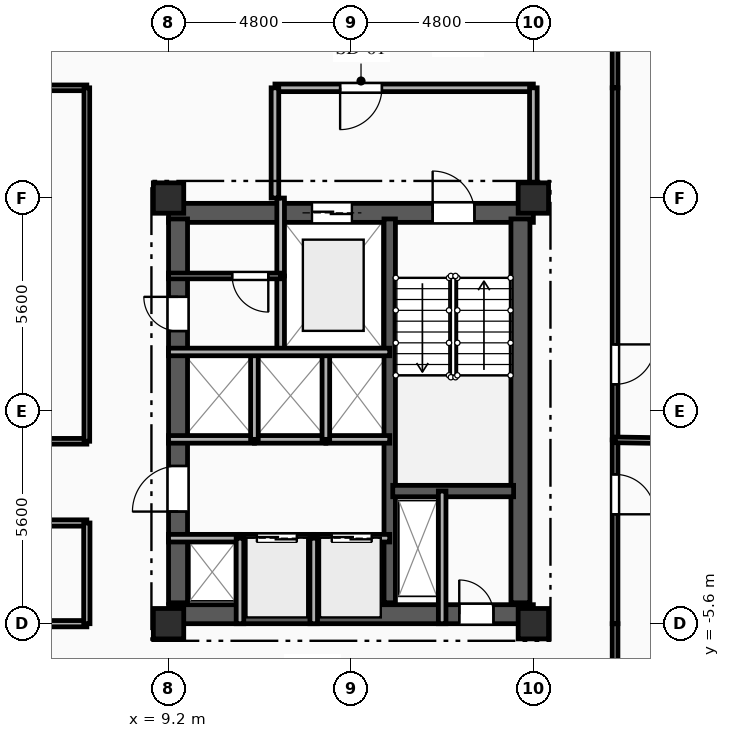
"""IFC4 building model, lengths in metres.
Left out: names, types, materials, properties, quantities, classifications, styles, units other than length and angle.
Written with IfcOpenShell. Run it as: python <this file> out.ifc"""

import sys

from ifc_helpers import new_model, si_unit, direction, frame, frame_2d, origin, origin_2d, place, context, subcontext, project, spatial, rectangle, extrude, element, fill, save


model = new_model("IFC4")
c1 = context("Model", 3, precision=1e-05, world=origin(), true_north=direction((0.0, 1.0)))
c2 = subcontext(c1, "Body", "Model", "MODEL_VIEW")
j1 = project(units=[si_unit("LENGTHUNIT", "METRE"), si_unit("PLANEANGLEUNIT", "RADIAN")], contexts=[c1])
p1 = place(None, origin())
s1 = spatial("IfcSite", under=j1, at=p1, CompositionType="ELEMENT")
p2 = place(p1, origin())
s2 = spatial("IfcBuilding", under=s1, at=p2, CompositionType="ELEMENT")
p3 = place(p2, frame((0.0, 0.0, 213.15)))
s3 = spatial("IfcBuildingStorey", under=s2, at=p3, CompositionType="ELEMENT", Elevation=213.15)
for number, where, z_axis, x_axis in (
    (1, (9.2, -5.6, 0.0), (0.0, 0.0, 1.0), (1.0, 0.0, 0.0)),
    (2, (9.2, 5.6, 0.0), (0.0, 0.0, 1.0), (1.0, 0.0, 0.0)),
    (3, (18.8, -5.6, 0.0), (0.0, 0.0, 1.0), (1.0, 0.0, 0.0)),
    (4, (18.8, 5.6, 0.0), (0.0, 0.0, 1.0), (1.0, 0.0, 0.0)),
):
    element("IfcColumn", number, at=place(p3, frame(where, z_axis=z_axis, x_axis=x_axis)), inside=s3, PredefinedType="COLUMN", context=c2, shape_type="SweptSolid", body=[
        extrude(rectangle(XDim=0.8, YDim=0.8, at=origin_2d()), origin(), (0.0, 0.0, 1.0), 3.35),
    ])
p4 = place(p3, frame((9.2, 5.21, 0.0), z_axis=(0.0, 0.0, 1.0), x_axis=(1.0, 0.0, 0.0)))
e5 = element("IfcWall", 5, at=p4, inside=s3, PredefinedType="SHEAR", context=c2, shape_type="SweptSolid", body=[
    extrude(rectangle(XDim=9.6, YDim=0.5, at=frame_2d((4.8, 0.0))), origin(), (0.0, 0.0, 1.0), 3.04),
])
p5 = place(p4, frame((6.95, 0.0, 0.0)))
e6 = element("IfcOpeningElement", 6, at=p5, cuts=e5, PredefinedType="OPENING", context=c2, shape_type="SweptSolid", body=[
    extrude(rectangle(XDim=1.1, YDim=2.15, at=frame_2d((0.55, 1.075))), frame((0.0, 0.26, 0.0), z_axis=(0.0, -1.0, 0.0), x_axis=(1.0, 0.0, 0.0)), (0.0, 0.0, 1.0), 0.52),
])
p6 = place(p4, frame((3.775, 0.0, 0.0)))
e7 = element("IfcOpeningElement", 7, at=p6, cuts=e5, PredefinedType="OPENING", context=c2, shape_type="SweptSolid", body=[
    extrude(rectangle(XDim=1.05, YDim=2.1, at=frame_2d((0.525, 1.05))), frame((0.0, 0.26, 0.0), z_axis=(0.0, -1.0, 0.0), x_axis=(1.0, 0.0, 0.0)), (0.0, 0.0, 1.0), 0.52),
])
p7 = place(p3, frame((9.2, -5.35, 0.0), z_axis=(0.0, 0.0, 1.0), x_axis=(1.0, 0.0, 0.0)))
e8 = element("IfcWall", 8, at=p7, inside=s3, PredefinedType="SHEAR", context=c2, shape_type="SweptSolid", body=[
    extrude(rectangle(XDim=9.6, YDim=0.5, at=frame_2d((4.8, 0.0))), origin(), (0.0, 0.0, 1.0), 3.04),
])
p8 = place(p7, frame((7.65, 0.0, 0.0)))
e9 = element("IfcOpeningElement", 9, at=p8, cuts=e8, PredefinedType="OPENING", context=c2, shape_type="SweptSolid", body=[
    extrude(rectangle(XDim=0.9, YDim=2.1, at=frame_2d((0.45, 1.05))), frame((0.0, 0.26, 0.0), z_axis=(0.0, -1.0, 0.0), x_axis=(1.0, 0.0, 0.0)), (0.0, 0.0, 1.0), 0.52),
])
p9 = place(p3, frame((9.45, -5.05, 0.0), z_axis=(0.0, 0.0, 1.0), x_axis=(0.0, 1.0, 0.0)))
e10 = element("IfcWall", 10, at=p9, inside=s3, PredefinedType="SHEAR", context=c2, shape_type="SweptSolid", body=[
    extrude(rectangle(XDim=10.1, YDim=0.5, at=frame_2d((5.05, 0.0))), origin(), (0.0, 0.0, 1.0), 3.04),
])
p10 = place(p9, frame((7.15, 0.0, 0.0)))
e11 = element("IfcOpeningElement", 11, at=p10, cuts=e10, PredefinedType="OPENING", context=c2, shape_type="SweptSolid", body=[
    extrude(rectangle(XDim=0.9, YDim=2.1, at=frame_2d((0.45, 1.05))), frame((0.0, 0.26, 0.0), z_axis=(0.0, -1.0, 0.0), x_axis=(1.0, 0.0, 0.0)), (0.0, 0.0, 1.0), 0.52),
])
p11 = place(p9, frame((2.4, 0.0, 0.0)))
e12 = element("IfcOpeningElement", 12, at=p11, cuts=e10, PredefinedType="OPENING", context=c2, shape_type="SweptSolid", body=[
    extrude(rectangle(XDim=1.2, YDim=2.15, at=frame_2d((0.6, 1.075))), frame((0.0, 0.26, 0.0), z_axis=(0.0, -1.0, 0.0), x_axis=(1.0, 0.0, 0.0)), (0.0, 0.0, 1.0), 0.52),
])
p12 = place(p3, frame((18.46, -5.05, 0.0), z_axis=(0.0, 0.0, 1.0), x_axis=(0.0, 1.0, 0.0)))
e13 = element("IfcWall", 13, at=p12, inside=s3, PredefinedType="SHEAR", context=c2, shape_type="SweptSolid", body=[
    extrude(rectangle(XDim=10.1, YDim=0.5, at=frame_2d((5.05, 0.0))), origin(), (0.0, 0.0, 1.0), 3.04),
])
p13 = place(p3, frame((15.02, -5.05, 0.0), z_axis=(0.0, 0.0, 1.0), x_axis=(0.0, 1.0, 0.0)))
e14 = element("IfcWall", 14, at=p13, inside=s3, PredefinedType="SHEAR", context=c2, shape_type="SweptSolid", body=[
    extrude(rectangle(XDim=10.1, YDim=0.3, at=frame_2d((5.05, 0.0))), origin(), (0.0, 0.0, 1.0), 3.04),
])
p14 = place(p3, frame((15.1, -2.11, 0.0), z_axis=(0.0, 0.0, 1.0), x_axis=(1.0, 0.0, 0.0)))
e15 = element("IfcWall", 15, at=p14, inside=s3, PredefinedType="SHEAR", context=c2, shape_type="SweptSolid", body=[
    extrude(rectangle(XDim=3.18, YDim=0.3, at=frame_2d((1.59, 0.0))), origin(), (0.0, 0.0, 1.0), 3.04),
])
p15 = place(p3, frame((16.4, -2.11, 0.0), z_axis=(0.0, 0.0, 1.0), x_axis=(0.0, -1.0, 0.0)))
e16 = element("IfcWall", 16, at=p15, inside=s3, PredefinedType="PARTITIONING", context=c2, shape_type="SweptSolid", body=[
    extrude(rectangle(XDim=3.49, YDim=0.2, at=frame_2d((1.745, 0.0))), origin(), (0.0, 0.0, 1.0), 3.04),
])
p16 = place(p3, frame((12.15, 3.55, 0.0), z_axis=(0.0, 0.0, 1.0), x_axis=(0.0, -1.0, 0.0)))
e17 = element("IfcWall", 17, at=p16, inside=s3, PredefinedType="PARTITIONING", context=c2, shape_type="SweptSolid", body=[
    extrude(rectangle(XDim=2.0, YDim=0.2, at=frame_2d((1.0, 0.0))), origin(), (0.0, 0.0, 1.0), 3.04),
])
p17 = place(p3, frame((12.15, 5.6, 0.0), z_axis=(0.0, 0.0, 1.0), x_axis=(0.0, -1.0, 0.0)))
e18 = element("IfcWall", 18, at=p17, inside=s3, PredefinedType="PARTITIONING", context=c2, shape_type="SweptSolid", body=[
    extrude(rectangle(XDim=2.05, YDim=0.2, at=frame_2d((1.025, 0.0))), origin(), (0.0, 0.0, 1.0), 3.04),
])
p18 = place(p3, frame((18.8, 8.5, 0.0), z_axis=(0.0, 0.0, 1.0), x_axis=(-1.0, 0.0, 0.0)))
e19 = element("IfcWall", 19, at=p18, inside=s3, PredefinedType="PARTITIONING", context=c2, shape_type="SweptSolid", body=[
    extrude(rectangle(XDim=6.8, YDim=0.2, at=frame_2d((3.4, 0.0))), origin(), (0.0, 0.0, 1.0), 3.04),
])
p19 = place(p18, frame((3.985, 0.0, 0.0)))
e20 = element("IfcOpeningElement", 20, at=p19, cuts=e19, PredefinedType="OPENING", context=c2, shape_type="SweptSolid", body=[
    extrude(rectangle(XDim=1.1, YDim=2.15, at=frame_2d((0.55, 1.075))), frame((0.0, 0.11, 0.0), z_axis=(0.0, -1.0, 0.0), x_axis=(1.0, 0.0, 0.0)), (0.0, 0.0, 1.0), 0.22),
])
p20 = place(p3, frame((18.8, 5.6, 0.0), z_axis=(0.0, 0.0, 1.0), x_axis=(0.0, 1.0, 0.0)))
e21 = element("IfcWall", 21, at=p20, inside=s3, PredefinedType="PARTITIONING", context=c2, shape_type="SweptSolid", body=[
    extrude(rectangle(XDim=2.9, YDim=0.2, at=frame_2d((1.45, 0.0))), origin(), (0.0, 0.0, 1.0), 2.665),
])
p21 = place(p3, frame((12.0, 8.5, 0.0), z_axis=(0.0, 0.0, 1.0), x_axis=(0.0, -1.0, 0.0)))
e22 = element("IfcWall", 22, at=p21, inside=s3, PredefinedType="PARTITIONING", context=c2, shape_type="SweptSolid", body=[
    extrude(rectangle(XDim=2.9, YDim=0.2, at=frame_2d((1.45, 0.0))), origin(), (0.0, 0.0, 1.0), 3.04),
])
p22 = place(p3, frame((12.15, 3.55, 0.0), z_axis=(0.0, 0.0, 1.0), x_axis=(-1.0, 0.0, 0.0)))
e23 = element("IfcWall", 23, at=p22, inside=s3, PredefinedType="PARTITIONING", context=c2, shape_type="SweptSolid", body=[
    extrude(rectangle(XDim=2.95, YDim=0.15, at=frame_2d((1.475, 0.0))), origin(), (0.0, 0.0, 1.0), 3.04),
])
p23 = place(p22, frame((0.325, 0.0, 0.0)))
e24 = element("IfcOpeningElement", 24, at=p23, cuts=e23, PredefinedType="OPENING", context=c2, shape_type="SweptSolid", body=[
    extrude(rectangle(XDim=0.95, YDim=2.1, at=frame_2d((0.475, 1.05))), frame((0.0, 0.085, 0.0), z_axis=(0.0, -1.0, 0.0), x_axis=(1.0, 0.0, 0.0)), (0.0, 0.0, 1.0), 0.17),
])
p24 = place(p3, frame((9.2, -3.35, 0.0), z_axis=(0.0, 0.0, 1.0), x_axis=(1.0, 0.0, 0.0)))
e25 = element("IfcWall", 25, at=p24, inside=s3, PredefinedType="PARTITIONING", context=c2, shape_type="SweptSolid", body=[
    extrude(rectangle(XDim=1.88, YDim=0.2, at=frame_2d((0.94, 0.0))), origin(), (0.0, 0.0, 1.0), 2.755),
])
p25 = place(p3, frame((11.08, -3.35, 0.0), z_axis=(0.0, 0.0, 1.0), x_axis=(1.0, 0.0, 0.0)))
e26 = element("IfcWall", 26, at=p25, inside=s3, PredefinedType="PARTITIONING", context=c2, shape_type="SweptSolid", body=[
    extrude(rectangle(XDim=1.94, YDim=0.2, at=frame_2d((0.97, 0.0))), origin(), (0.0, 0.0, 1.0), 3.04),
])
p26 = place(p25, frame((0.445, 0.0, 0.0)))
e27 = element("IfcOpeningElement", 27, at=p26, cuts=e26, PredefinedType="OPENING", context=c2, shape_type="SweptSolid", body=[
    extrude(rectangle(XDim=1.05, YDim=2.1, at=frame_2d((0.525, 1.05))), frame((0.0, 0.11, 0.0), z_axis=(0.0, -1.0, 0.0), x_axis=(1.0, 0.0, 0.0)), (0.0, 0.0, 1.0), 0.22),
])
p27 = place(p3, frame((13.02, -3.35, 0.0), z_axis=(0.0, 0.0, 1.0), x_axis=(1.0, 0.0, 0.0)))
e28 = element("IfcWall", 28, at=p27, inside=s3, PredefinedType="PARTITIONING", context=c2, shape_type="SweptSolid", body=[
    extrude(rectangle(XDim=2.0, YDim=0.2, at=frame_2d((1.0, 0.0))), origin(), (0.0, 0.0, 1.0), 3.04),
])
p28 = place(p27, frame((0.475, 0.0, 0.0)))
e29 = element("IfcOpeningElement", 29, at=p28, cuts=e28, PredefinedType="OPENING", context=c2, shape_type="SweptSolid", body=[
    extrude(rectangle(XDim=1.05, YDim=2.1, at=frame_2d((0.525, 1.05))), frame((0.0, 0.11, 0.0), z_axis=(0.0, -1.0, 0.0), x_axis=(1.0, 0.0, 0.0)), (0.0, 0.0, 1.0), 0.22),
])
p29 = place(p3, frame((11.46, -0.75, 0.0), z_axis=(0.0, 0.0, 1.0), x_axis=(-1.0, 0.0, 0.0)))
e30 = element("IfcWall", 30, at=p29, inside=s3, PredefinedType="PARTITIONING", context=c2, shape_type="SweptSolid", body=[
    extrude(rectangle(XDim=2.26, YDim=0.2, at=frame_2d((1.13, 0.0))), origin(), (0.0, 0.0, 1.0), 3.04),
])
p30 = place(p3, frame((13.34, -0.75, 0.0), z_axis=(0.0, 0.0, 1.0), x_axis=(-1.0, 0.0, 0.0)))
e31 = element("IfcWall", 31, at=p30, inside=s3, PredefinedType="PARTITIONING", context=c2, shape_type="SweptSolid", body=[
    extrude(rectangle(XDim=1.88, YDim=0.2, at=frame_2d((0.94, 0.0))), origin(), (0.0, 0.0, 1.0), 3.04),
])
p31 = place(p3, frame((15.02, -0.75, 0.0), z_axis=(0.0, 0.0, 1.0), x_axis=(-1.0, 0.0, 0.0)))
e32 = element("IfcWall", 32, at=p31, inside=s3, PredefinedType="PARTITIONING", context=c2, shape_type="SweptSolid", body=[
    extrude(rectangle(XDim=1.68, YDim=0.2, at=frame_2d((0.84, 0.0))), origin(), (0.0, 0.0, 1.0), 3.04),
])
for number, where, z_axis, x_axis in (
    (33, (11.08, -5.6, 0.0), (0.0, 0.0, 1.0), (0.0, 1.0, 0.0)),
    (34, (13.02, -5.6, 0.0), (0.0, 0.0, 1.0), (0.0, 1.0, 0.0)),
):
    element("IfcWall", number, at=place(p3, frame(where, z_axis=z_axis, x_axis=x_axis)), inside=s3, PredefinedType="PARTITIONING", context=c2, shape_type="SweptSolid", body=[
        extrude(rectangle(XDim=2.25, YDim=0.2, at=frame_2d((1.125, 0.0))), origin(), (0.0, 0.0, 1.0), 3.04),
    ])
for number, where, z_axis, x_axis in (
    (35, (11.46, -0.75, 0.0), (0.0, 0.0, 1.0), (0.0, 1.0, 0.0)),
    (36, (13.34, -0.75, 0.0), (0.0, 0.0, 1.0), (0.0, 1.0, 0.0)),
):
    element("IfcWall", number, at=place(p3, frame(where, z_axis=z_axis, x_axis=x_axis)), inside=s3, PredefinedType="PARTITIONING", context=c2, shape_type="SweptSolid", body=[
        extrude(rectangle(XDim=2.3, YDim=0.2, at=frame_2d((1.15, 0.0))), origin(), (0.0, 0.0, 1.0), 3.04),
    ])
p32 = place(p3, frame((20.95, 10.65, 0.0), z_axis=(0.0, 0.0, 1.0), x_axis=(0.0, -1.0, 0.0)))
e37 = element("IfcWall", 37, at=p32, inside=s3, PredefinedType="PARTITIONING", context=c2, shape_type="SweptSolid", body=[
    extrude(rectangle(XDim=2.15, YDim=0.15, at=frame_2d((1.075, 0.0))), origin(), (0.0, 0.0, 1.0), 3.04),
])
p33 = place(p3, frame((7.05, 8.5, 0.0), z_axis=(0.0, 0.0, 1.0), x_axis=(-1.0, 0.0, 0.0)))
e38 = element("IfcWall", 38, at=p33, inside=s3, PredefinedType="PARTITIONING", context=c2, shape_type="SweptSolid", body=[
    extrude(rectangle(XDim=7.05, YDim=0.15, at=frame_2d((3.525, 0.0))), origin(), (0.0, 0.0, 1.0), 3.04),
])
p34 = place(p3, frame((20.95, -5.6, 0.0), z_axis=(0.0, 0.0, 1.0), x_axis=(0.0, -1.0, 0.0)))
e39 = element("IfcWall", 39, at=p34, inside=s3, PredefinedType="PARTITIONING", context=c2, shape_type="SweptSolid", body=[
    extrude(rectangle(XDim=2.15, YDim=0.15, at=frame_2d((1.075, 0.0))), origin(), (0.0, 0.0, 1.0), 3.04),
])
p35 = place(p3, frame((0.0, -5.6, 0.0), z_axis=(0.0, 0.0, 1.0), x_axis=(1.0, 0.0, 0.0)))
e40 = element("IfcWall", 40, at=p35, inside=s3, PredefinedType="PARTITIONING", context=c2, shape_type="SweptSolid", body=[
    extrude(rectangle(XDim=7.05, YDim=0.165, at=frame_2d((3.525, 0.0))), origin(), (0.0, 0.0, 1.0), 2.525),
])
p36 = place(p3, frame((20.95, -0.763, 0.0), z_axis=(0.0, 0.0, 1.0), x_axis=(0.0, -1.0, 0.0)))
e41 = element("IfcWall", 41, at=p36, inside=s3, PredefinedType="PARTITIONING", context=c2, shape_type="SweptSolid", body=[
    extrude(rectangle(XDim=4.837, YDim=0.15, at=frame_2d((2.418, 0.0))), origin(), (0.0, 0.0, 1.0), 2.695),
])
p37 = place(p36, frame((0.908, 0.0, 0.0)))
e42 = element("IfcOpeningElement", 42, at=p37, cuts=e41, PredefinedType="OPENING", context=c2, shape_type="SweptSolid", body=[
    extrude(rectangle(XDim=1.05, YDim=2.15, at=frame_2d((0.525, 1.075))), frame((0.0, 0.085, 0.0), z_axis=(0.0, -1.0, 0.0), x_axis=(1.0, 0.0, 0.0)), (0.0, 0.0, 1.0), 0.17),
])
p38 = place(p3, frame((20.95, 8.5, 0.0), z_axis=(0.0, 0.0, 1.0), x_axis=(0.0, -1.0, 0.0)))
e43 = element("IfcWall", 43, at=p38, inside=s3, PredefinedType="PARTITIONING", context=c2, shape_type="SweptSolid", body=[
    extrude(rectangle(XDim=9.263, YDim=0.15, at=frame_2d((4.632, 0.0))), origin(), (0.0, 0.0, 1.0), 2.695),
])
p39 = place(p38, frame((6.751, 0.0, 0.0)))
e44 = element("IfcOpeningElement", 44, at=p39, cuts=e43, PredefinedType="OPENING", context=c2, shape_type="SweptSolid", body=[
    extrude(rectangle(XDim=1.05, YDim=2.15, at=frame_2d((0.525, 1.075))), frame((0.0, 0.085, 0.0), z_axis=(0.0, -1.0, 0.0), x_axis=(1.0, 0.0, 0.0)), (0.0, 0.0, 1.0), 0.17),
])
p40 = place(p3, frame((-7.05, -0.8, 0.0), z_axis=(0.0, 0.0, 1.0), x_axis=(1.0, 0.0, 0.0)))
e45 = element("IfcWall", 45, at=p40, inside=s3, PredefinedType="PARTITIONING", context=c2, shape_type="SweptSolid", body=[
    extrude(rectangle(XDim=14.1, YDim=0.15, at=frame_2d((7.05, 0.0))), origin(), (0.0, 0.0, 1.0), 3.04),
])
p41 = place(p40, frame((6.525, 0.0, 0.0)))
e46 = element("IfcOpeningElement", 46, at=p41, cuts=e45, PredefinedType="OPENING", context=c2, shape_type="SweptSolid", body=[
    extrude(rectangle(XDim=1.05, YDim=2.15, at=frame_2d((0.525, 1.075))), frame((0.0, 0.085, 0.0), z_axis=(0.0, -1.0, 0.0), x_axis=(1.0, 0.0, 0.0)), (0.0, 0.0, 1.0), 0.17),
])
p42 = place(p3, frame((7.05, -2.95, 0.0), z_axis=(0.0, 0.0, 1.0), x_axis=(-1.0, 0.0, 0.0)))
e47 = element("IfcWall", 47, at=p42, inside=s3, PredefinedType="PARTITIONING", context=c2, shape_type="SweptSolid", body=[
    extrude(rectangle(XDim=14.1, YDim=0.165, at=frame_2d((7.05, 0.0))), origin(), (0.0, 0.0, 1.0), 3.04),
])
p43 = place(p42, frame((6.475, 0.0, 0.0)))
e48 = element("IfcOpeningElement", 48, at=p43, cuts=e47, PredefinedType="OPENING", context=c2, shape_type="SweptSolid", body=[
    extrude(rectangle(XDim=1.15, YDim=2.15, at=frame_2d((0.575, 1.075))), frame((0.0, 0.093, 0.0), z_axis=(0.0, -1.0, 0.0), x_axis=(1.0, 0.0, 0.0)), (0.0, 0.0, 1.0), 0.185),
])
p44 = place(p3, frame((7.05, -0.8, 0.0), z_axis=(0.0, 0.0, 1.0), x_axis=(0.0, 1.0, 0.0)))
e49 = element("IfcWall", 49, at=p44, inside=s3, PredefinedType="PARTITIONING", context=c2, shape_type="SweptSolid", body=[
    extrude(rectangle(XDim=9.3, YDim=0.15, at=frame_2d((4.65, 0.0))), origin(), (0.0, 0.0, 1.0), 3.04),
])
p45 = place(p3, frame((7.05, -5.6, 0.0), z_axis=(0.0, 0.0, 1.0), x_axis=(0.0, 1.0, 0.0)))
e50 = element("IfcWall", 50, at=p45, inside=s3, PredefinedType="PARTITIONING", context=c2, shape_type="SweptSolid", body=[
    extrude(rectangle(XDim=2.65, YDim=0.165, at=frame_2d((1.325, 0.0))), origin(), (0.0, 0.0, 1.0), 3.04),
])
p46 = place(p3, frame((20.95, -0.763, 0.0), z_axis=(0.0, 0.0, 1.0), x_axis=(0.999875696831, -0.015766765259, 0.0)))
e51 = element("IfcWall", 51, at=p46, inside=s3, PredefinedType="PARTITIONING", context=c2, shape_type="SweptSolid", body=[
    extrude(rectangle(XDim=2.787, YDim=0.15, at=frame_2d((1.394, 0.0))), origin(), (0.0, 0.0, 1.0), 3.04),
])
p47 = place(p3, frame((9.2, 1.55, 0.0), z_axis=(0.0, 0.0, 1.0), x_axis=(1.0, 0.0, 0.0)))
e52 = element("IfcWall", 52, at=p47, inside=s3, PredefinedType="PARTITIONING", context=c2, shape_type="SweptSolid", body=[
    extrude(rectangle(XDim=5.82, YDim=0.2, at=frame_2d((2.91, 0.0))), origin(), (0.0, 0.0, 1.0), 3.04),
])
p48 = place(p5, origin())
e53 = element("IfcDoor", 53, at=p48, inside=s3, OperationType="SINGLE_SWING_LEFT", PredefinedType="DOOR", context=c2, shape_type="SweptSolid", body=[
    extrude(rectangle(XDim=1.1, YDim=2.15, at=frame_2d((0.55, 1.075))), frame((0.0, 0.025, 0.0), z_axis=(0.0, -1.0, 0.0), x_axis=(1.0, 0.0, 0.0)), (0.0, 0.0, 1.0), 0.05),
])
fill(e6, e53)
p49 = place(p6, origin())
e54 = element("IfcDoor", 54, at=p49, inside=s3, OperationType="DOUBLE_DOOR_SLIDING", PredefinedType="DOOR", context=c2, shape_type="SweptSolid", body=[
    extrude(rectangle(XDim=1.05, YDim=2.1, at=frame_2d((0.525, 1.05))), frame((0.0, 0.025, 0.0), z_axis=(0.0, -1.0, 0.0), x_axis=(1.0, 0.0, 0.0)), (0.0, 0.0, 1.0), 0.05),
])
fill(e7, e54)
p50 = place(p8, origin())
e55 = element("IfcDoor", 55, at=p50, inside=s3, OperationType="SINGLE_SWING_LEFT", PredefinedType="DOOR", context=c2, shape_type="SweptSolid", body=[
    extrude(rectangle(XDim=0.9, YDim=2.1, at=frame_2d((0.45, 1.05))), frame((0.0, 0.025, 0.0), z_axis=(0.0, -1.0, 0.0), x_axis=(1.0, 0.0, 0.0)), (0.0, 0.0, 1.0), 0.05),
])
fill(e9, e55)
p51 = place(p19, origin())
e56 = element("IfcDoor", 56, at=p51, inside=s3, OperationType="SINGLE_SWING_RIGHT", PredefinedType="DOOR", context=c2, shape_type="SweptSolid", body=[
    extrude(rectangle(XDim=1.1, YDim=2.15, at=frame_2d((0.55, 1.075))), frame((0.0, 0.025, 0.0), z_axis=(0.0, -1.0, 0.0), x_axis=(1.0, 0.0, 0.0)), (0.0, 0.0, 1.0), 0.05),
])
fill(e20, e56)
p52 = place(p23, origin())
e57 = element("IfcDoor", 57, at=p52, inside=s3, OperationType="SINGLE_SWING_LEFT", PredefinedType="DOOR", context=c2, shape_type="SweptSolid", body=[
    extrude(rectangle(XDim=0.95, YDim=2.1, at=frame_2d((0.475, 1.05))), frame((0.0, 0.025, 0.0), z_axis=(0.0, -1.0, 0.0), x_axis=(1.0, 0.0, 0.0)), (0.0, 0.0, 1.0), 0.05),
])
fill(e24, e57)
p53 = place(p10, origin())
e58 = element("IfcDoor", 58, at=p53, inside=s3, OperationType="SINGLE_SWING_RIGHT", PredefinedType="DOOR", context=c2, shape_type="SweptSolid", body=[
    extrude(rectangle(XDim=0.9, YDim=2.1, at=frame_2d((0.45, 1.05))), frame((0.0, 0.025, 0.0), z_axis=(0.0, -1.0, 0.0), x_axis=(1.0, 0.0, 0.0)), (0.0, 0.0, 1.0), 0.05),
])
fill(e11, e58)
p54 = place(p26, origin())
e59 = element("IfcDoor", 59, at=p54, inside=s3, OperationType="DOUBLE_DOOR_SLIDING", PredefinedType="DOOR", context=c2, shape_type="SweptSolid", body=[
    extrude(rectangle(XDim=1.05, YDim=2.1, at=frame_2d((0.525, 1.05))), frame((0.0, 0.025, 0.0), z_axis=(0.0, -1.0, 0.0), x_axis=(1.0, 0.0, 0.0)), (0.0, 0.0, 1.0), 0.05),
])
fill(e27, e59)
p55 = place(p28, origin())
e60 = element("IfcDoor", 60, at=p55, inside=s3, OperationType="DOUBLE_DOOR_SLIDING", PredefinedType="DOOR", context=c2, shape_type="SweptSolid", body=[
    extrude(rectangle(XDim=1.05, YDim=2.1, at=frame_2d((0.525, 1.05))), frame((0.0, 0.025, 0.0), z_axis=(0.0, -1.0, 0.0), x_axis=(1.0, 0.0, 0.0)), (0.0, 0.0, 1.0), 0.05),
])
fill(e29, e60)
p56 = place(p11, origin())
e61 = element("IfcDoor", 61, at=p56, inside=s3, OperationType="SINGLE_SWING_LEFT", PredefinedType="DOOR", context=c2, shape_type="SweptSolid", body=[
    extrude(rectangle(XDim=1.2, YDim=2.15, at=frame_2d((0.6, 1.075))), frame((0.0, 0.025, 0.0), z_axis=(0.0, -1.0, 0.0), x_axis=(1.0, 0.0, 0.0)), (0.0, 0.0, 1.0), 0.05),
])
fill(e12, e61)
p57 = place(p37, origin())
e62 = element("IfcDoor", 62, at=p57, inside=s3, OperationType="SINGLE_SWING_RIGHT", PredefinedType="DOOR", context=c2, shape_type="SweptSolid", body=[
    extrude(rectangle(XDim=1.05, YDim=2.15, at=frame_2d((0.525, 1.075))), frame((0.0, 0.025, 0.0), z_axis=(0.0, -1.0, 0.0), x_axis=(1.0, 0.0, 0.0)), (0.0, 0.0, 1.0), 0.05),
])
fill(e42, e62)
p58 = place(p39, origin())
e63 = element("IfcDoor", 63, at=p58, inside=s3, OperationType="SINGLE_SWING_LEFT", PredefinedType="DOOR", context=c2, shape_type="SweptSolid", body=[
    extrude(rectangle(XDim=1.05, YDim=2.15, at=frame_2d((0.525, 1.075))), frame((0.0, 0.025, 0.0), z_axis=(0.0, -1.0, 0.0), x_axis=(1.0, 0.0, 0.0)), (0.0, 0.0, 1.0), 0.05),
])
fill(e44, e63)
save(model, sys.argv[1])
